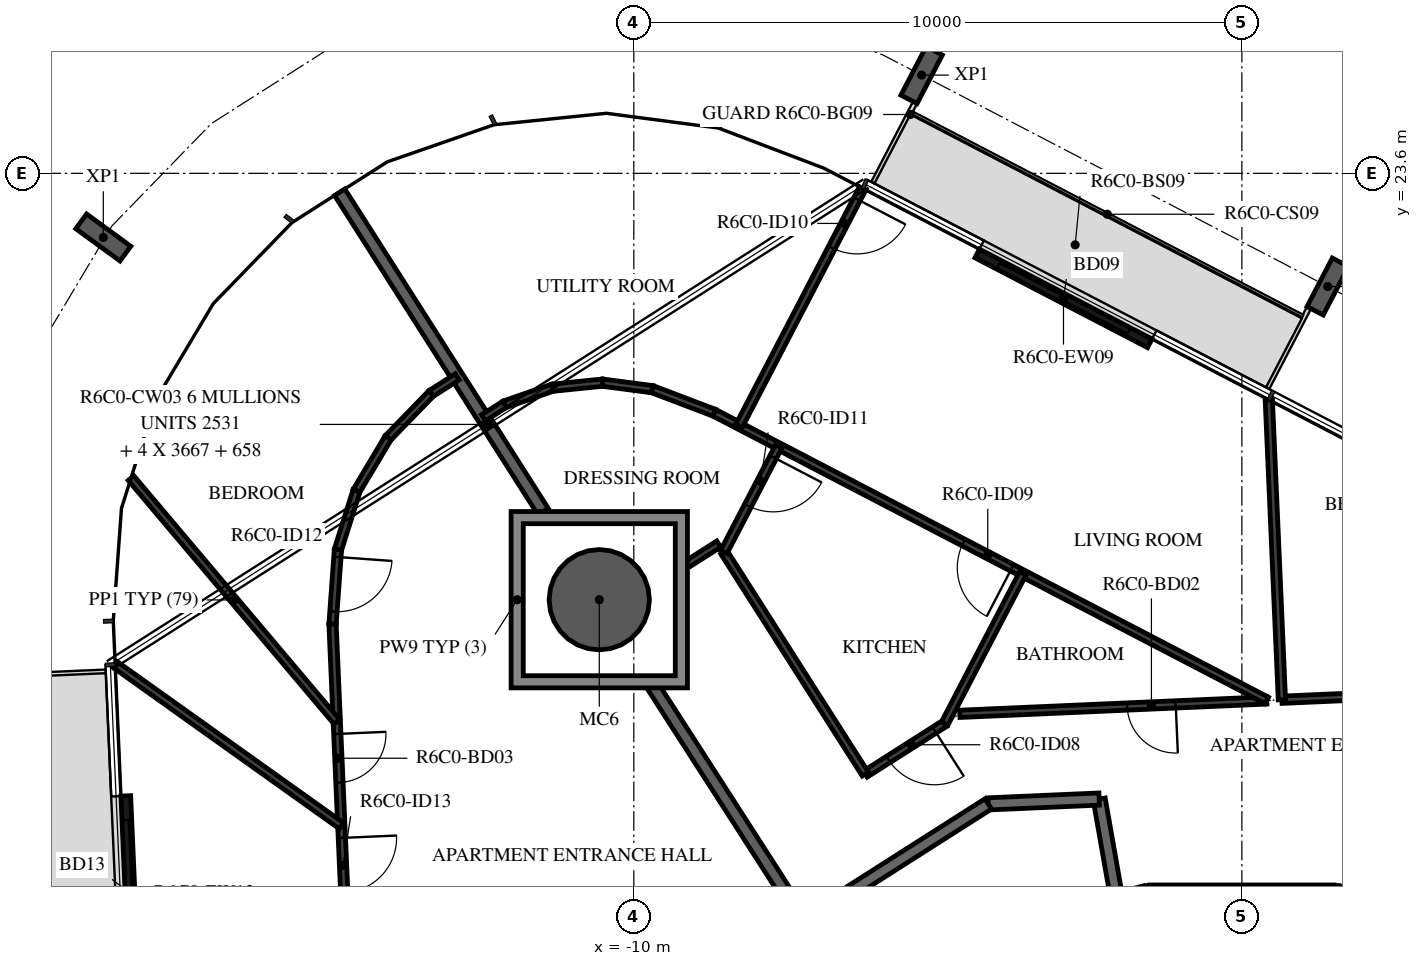
"""IFC4 building model, lengths in metres.
Left out: names, types, materials, properties, quantities, classifications, styles, units other than length and angle.
Written with IfcOpenShell. Run it as: python <this file> out.ifc"""

import sys

from ifc_helpers import new_model, si_unit, direction, frame, frame_2d, origin, origin_2d, place, context, subcontext, project, spatial, polyline, rectangle, hollow_circle, i_section, outline, extrude, element, fill, save


model = new_model("IFC4")
c1 = context("Model", 3, precision=1e-05, world=origin(), true_north=direction((0.0, 1.0)))
c2 = subcontext(c1, "Body", "Model", "MODEL_VIEW")
j1 = project(units=[si_unit("LENGTHUNIT", "METRE"), si_unit("PLANEANGLEUNIT", "RADIAN")], contexts=[c1])
p1 = place(None, origin())
s1 = spatial("IfcSite", under=j1, at=p1, CompositionType="ELEMENT")
p2 = place(p1, origin())
s2 = spatial("IfcBuilding", under=s1, at=p2, CompositionType="ELEMENT")
p3 = place(p2, frame((0.0, 0.0, 254.7)))
s3 = spatial("IfcBuildingStorey", under=s2, at=p3, CompositionType="ELEMENT", Elevation=254.7)
p4 = place(p3, frame((-10.568, 16.588, -0.38), z_axis=(0.0, 0.0, 1.0), x_axis=(1.0, 0.0, 0.0)))
e1 = element("IfcColumn", 1, at=p4, inside=s3, PredefinedType="COLUMN", context=c2, shape_type="SweptSolid", body=[
    extrude(hollow_circle(Radius=0.825, WallThickness=0.04, at=origin_2d()), origin(), (0.0, 0.0, 1.0), 2.616),
])
for number, where, z_axis, x_axis in (
    (2, (1.412, 21.739, -0.38), (0.0, 0.0, 1.0), (0.887, -0.462, 0.0)),
    (3, (-5.267, 25.216, -0.38), (0.0, 0.0, 1.0), (0.887, -0.462, 0.0)),
    (4, (-18.724, 22.545, -0.38), (0.0, 0.0, 1.0), (0.59, 0.808, 0.0)),
):
    element("IfcColumn", number, at=place(p3, frame(where, z_axis=z_axis, x_axis=x_axis)), inside=s3, PredefinedType="COLUMN", context=c2, shape_type="SweptSolid", body=[
        extrude(i_section(OverallWidth=0.3, OverallDepth=0.9, WebThickness=0.019, FlangeThickness=0.035, FilletRadius=0.03, at=origin_2d()), origin(), (0.0, 0.0, 1.0), 2.616),
    ])
p5 = place(p3, frame((-1.515, 20.804, 0.0), z_axis=(0.0, 0.0, 1.0), x_axis=(-0.887014349583, 0.461741858221, 0.0)))
e5 = element("IfcWall", 5, at=p5, inside=s3, PredefinedType="STANDARD", context=c2, shape_type="SweptSolid", body=[
    extrude(rectangle(XDim=3.2, YDim=0.16, at=frame_2d((1.6, 0.0))), origin(), (0.0, 0.0, 1.0), 3.05),
])
p6 = place(p5, frame((0.4, 0.0, 0.0)))
e6 = element("IfcOpeningElement", 6, at=p6, cuts=e5, PredefinedType="OPENING", context=c2, shape_type="SweptSolid", body=[
    extrude(rectangle(XDim=2.4, YDim=2.4, at=frame_2d((1.2, 1.2))), frame((0.0, 0.09, 0.0), z_axis=(0.0, -1.0, 0.0), x_axis=(1.0, 0.0, 0.0)), (0.0, 0.0, 1.0), 0.18),
])
p7 = place(p3, frame((-18.355, 13.362, 0.0), z_axis=(0.0, 0.0, 1.0), x_axis=(0.043639181999, -0.999047357133, 0.0)))
e7 = element("IfcWall", 7, at=p7, inside=s3, PredefinedType="STANDARD", context=c2, shape_type="SweptSolid", body=[
    extrude(rectangle(XDim=3.2, YDim=0.16, at=frame_2d((1.6, 0.0))), origin(), (0.0, 0.0, 1.0), 3.05),
])
p8 = place(p7, frame((0.4, 0.0, 0.0)))
e8 = element("IfcOpeningElement", 8, at=p8, cuts=e7, PredefinedType="OPENING", context=c2, shape_type="SweptSolid", body=[
    extrude(rectangle(XDim=2.4, YDim=2.4, at=frame_2d((1.2, 1.2))), frame((0.0, 0.09, 0.0), z_axis=(0.0, -1.0, 0.0), x_axis=(1.0, 0.0, 0.0)), (0.0, 0.0, 1.0), 0.18),
])
p9 = place(p3, frame((4.479, 10.858, 0.0), z_axis=(0.0, 0.0, 1.0), x_axis=(-0.965948410781, 0.258734743916, 0.0)))
e9 = element("IfcWall", 9, at=p9, inside=s3, PredefinedType="SHEAR", context=c2, shape_type="SweptSolid", body=[
    extrude(rectangle(XDim=3.033, YDim=0.5, at=frame_2d((1.516, 0.0))), origin(), (0.0, 0.0, 1.0), 3.05),
])
p10 = place(p9, frame((1.066, 0.0, 0.0)))
e10 = element("IfcOpeningElement", 10, at=p10, cuts=e9, PredefinedType="OPENING", context=c2, shape_type="SweptSolid", body=[
    extrude(rectangle(XDim=0.9, YDim=2.1, at=frame_2d((0.45, 1.05))), frame((0.0, 0.26, 0.0), z_axis=(0.0, -1.0, 0.0), x_axis=(1.0, 0.0, 0.0)), (0.0, 0.0, 1.0), 0.52),
])
for number, where, z_axis, x_axis in (
    (11, (1.516, 11.647, 0.0), (0.0, 0.0, 1.0), (-1.0, 0.0, 0.0)),
    (12, (-1.55, 11.643, 0.0), (0.0, 0.0, 1.0), (-0.966, -0.259, 0.0)),
):
    element("IfcWall", number, at=place(p3, frame(where, z_axis=z_axis, x_axis=x_axis)), inside=s3, PredefinedType="SHEAR", context=c2, shape_type="SweptSolid", body=[
        extrude(rectangle(XDim=3.033, YDim=0.5, at=frame_2d((1.516, 0.0))), origin(), (0.0, 0.0, 1.0), 3.05),
    ])
p11 = place(p3, frame((-2.074, 11.761, 0.0), z_axis=(0.0, 0.0, 1.0), x_axis=(-0.173679082312, 0.984802303189, 0.0)))
e13 = element("IfcWall", 13, at=p11, inside=s3, PredefinedType="STANDARD", context=c2, shape_type="SweptSolid", body=[
    extrude(rectangle(XDim=1.573, YDim=0.2, at=frame_2d((0.787, 0.0))), origin(), (0.0, 0.0, 1.0), 3.05),
])
p12 = place(p3, frame((-2.347, 13.31, 0.0), z_axis=(0.0, 0.0, 1.0), x_axis=(-0.999050095671, -0.043576442492, 0.0)))
e14 = element("IfcWall", 14, at=p12, inside=s3, PredefinedType="STANDARD", context=c2, shape_type="SweptSolid", body=[
    extrude(rectangle(XDim=1.826, YDim=0.2, at=frame_2d((0.913, 0.0))), origin(), (0.0, 0.0, 1.0), 3.05),
])
p13 = place(p3, frame((-4.172, 13.231, 0.0), z_axis=(0.0, 0.0, 1.0), x_axis=(-0.843388394728, -0.537304397561, 0.0)))
e15 = element("IfcWall", 15, at=p13, inside=s3, PredefinedType="STANDARD", context=c2, shape_type="SweptSolid", body=[
    extrude(rectangle(XDim=7.181, YDim=0.2, at=frame_2d((3.59, 0.0))), origin(), (0.0, 0.0, 1.0), 3.05),
])
p14 = place(p3, frame((-9.69, 15.171, 0.0), z_axis=(0.0, 0.0, 1.0), x_axis=(0.540961372678, -0.841047438181, 0.0)))
e16 = element("IfcWall", 16, at=p14, inside=s3, PredefinedType="STANDARD", context=c2, shape_type="SweptSolid", body=[
    extrude(rectangle(XDim=4.602, YDim=0.2, at=frame_2d((2.301, 0.0))), origin(), (0.0, 0.0, 1.0), 3.05),
])
p15 = place(p3, frame((-14.837, 23.29, 0.0), z_axis=(0.0, 0.0, 1.0), x_axis=(0.537316863221, -0.843380452998, 0.0)))
e17 = element("IfcWall", 17, at=p15, inside=s3, PredefinedType="STANDARD", context=c2, shape_type="SweptSolid", body=[
    extrude(rectangle(XDim=6.227, YDim=0.2, at=frame_2d((3.113, 0.0))), origin(), (0.0, 0.0, 1.0), 3.05),
])
p16 = place(p3, frame((3.339, 15.06, 0.0), z_axis=(0.0, 0.0, 1.0), x_axis=(-0.999045829762, -0.043674134634, 0.0)))
e18 = element("IfcWall", 18, at=p16, inside=s3, PredefinedType="PARTITIONING", context=c2, shape_type="SweptSolid", body=[
    extrude(rectangle(XDim=2.683, YDim=0.12, at=frame_2d((1.342, 0.0))), origin(), (0.0, 0.0, 1.0), 3.05),
])
p17 = place(p3, frame((0.41, 14.932, 0.0), z_axis=(0.0, 0.0, 1.0), x_axis=(-0.99904802852, -0.043623808982, 0.0)))
e19 = element("IfcWall", 19, at=p17, inside=s3, PredefinedType="PARTITIONING", context=c2, shape_type="SweptSolid", body=[
    extrude(rectangle(XDim=5.054, YDim=0.12, at=frame_2d((2.527, 0.0))), origin(), (0.0, 0.0, 1.0), 3.05),
])
p18 = place(p17, frame((1.5, 0.0, 0.0)))
e20 = element("IfcOpeningElement", 20, at=p18, cuts=e19, PredefinedType="OPENING", context=c2, shape_type="SweptSolid", body=[
    extrude(rectangle(XDim=0.8, YDim=2.1, at=frame_2d((0.4, 1.05))), frame((0.0, 0.07, 0.0), z_axis=(0.0, -1.0, 0.0), x_axis=(1.0, 0.0, 0.0)), (0.0, 0.0, 1.0), 0.14),
])
p19 = place(p3, frame((-4.888, 14.553, 0.0), z_axis=(0.0, 0.0, 1.0), x_axis=(-0.843349608892, -0.537365273517, 0.0)))
e21 = element("IfcWall", 21, at=p19, inside=s3, PredefinedType="PARTITIONING", context=c2, shape_type="SweptSolid", body=[
    extrude(rectangle(XDim=1.548, YDim=0.12, at=frame_2d((0.774, 0.0))), origin(), (0.0, 0.0, 1.0), 3.05),
])
p20 = place(p19, frame((0.2, 0.0, 0.0)))
e22 = element("IfcOpeningElement", 22, at=p20, cuts=e21, PredefinedType="OPENING", context=c2, shape_type="SweptSolid", body=[
    extrude(rectangle(XDim=0.9, YDim=2.1, at=frame_2d((0.45, 1.05))), frame((0.0, 0.07, 0.0), z_axis=(0.0, -1.0, 0.0), x_axis=(1.0, 0.0, 0.0)), (0.0, 0.0, 1.0), 0.14),
])
p21 = place(p3, frame((-6.194, 13.721, 0.0), z_axis=(0.0, 0.0, 1.0), x_axis=(-0.537316807294, 0.843380488629, 0.0)))
e23 = element("IfcWall", 23, at=p21, inside=s3, PredefinedType="PARTITIONING", context=c2, shape_type="SweptSolid", body=[
    extrude(rectangle(XDim=4.331, YDim=0.12, at=frame_2d((2.165, 0.0))), origin(), (0.0, 0.0, 1.0), 3.05),
])
p22 = place(p3, frame((-8.604, 17.504, 0.0), z_axis=(0.0, 0.0, 1.0), x_axis=(-0.843265746233, -0.537496866251, 0.0)))
e24 = element("IfcWall", 24, at=p22, inside=s3, PredefinedType="PARTITIONING", context=c2, shape_type="SweptSolid", body=[
    extrude(rectangle(XDim=0.61, YDim=0.12, at=frame_2d((0.305, 0.0))), origin(), (0.0, 0.0, 1.0), 3.05),
])
p23 = place(p3, frame((0.442, 19.876, 0.0), z_axis=(0.0, 0.0, 1.0), x_axis=(0.04366038102, -0.999046430918, 0.0)))
e25 = element("IfcWall", 25, at=p23, inside=s3, PredefinedType="PARTITIONING", context=c2, shape_type="SweptSolid", body=[
    extrude(rectangle(XDim=4.938, YDim=0.12, at=frame_2d((2.469, 0.0))), origin(), (0.0, 0.0, 1.0), 3.05),
])
p24 = place(p3, frame((0.41, 14.932, 0.0), z_axis=(0.0, 0.0, 1.0), x_axis=(-0.887012293034, 0.461745808867, 0.0)))
e26 = element("IfcWall", 26, at=p24, inside=s3, PredefinedType="PARTITIONING", context=c2, shape_type="SweptSolid", body=[
    extrude(rectangle(XDim=10.246, YDim=0.12, at=frame_2d((5.123, 0.0))), origin(), (0.0, 0.0, 1.0), 3.05),
])
p25 = place(p24, frame((4.725, 0.0, 0.0)))
e27 = element("IfcOpeningElement", 27, at=p25, cuts=e26, PredefinedType="OPENING", context=c2, shape_type="SweptSolid", body=[
    extrude(rectangle(XDim=0.9, YDim=2.1, at=frame_2d((0.45, 1.05))), frame((0.0, 0.07, 0.0), z_axis=(0.0, -1.0, 0.0), x_axis=(1.0, 0.0, 0.0)), (0.0, 0.0, 1.0), 0.14),
])
p26 = place(p3, frame((-3.603, 17.021, 0.0), z_axis=(0.0, 0.0, 1.0), x_axis=(-0.46178633653, -0.886991194654, 0.0)))
e28 = element("IfcWall", 28, at=p26, inside=s3, PredefinedType="PARTITIONING", context=c2, shape_type="SweptSolid", body=[
    extrude(rectangle(XDim=2.783, YDim=0.12, at=frame_2d((1.392, 0.0))), origin(), (0.0, 0.0, 1.0), 3.05),
])
p27 = place(p3, frame((-6.237, 23.353, 0.0), z_axis=(0.0, 0.0, 1.0), x_axis=(-0.461714347673, -0.88702866986, 0.0)))
e29 = element("IfcWall", 29, at=p27, inside=s3, PredefinedType="PARTITIONING", context=c2, shape_type="SweptSolid", body=[
    extrude(rectangle(XDim=4.4, YDim=0.12, at=frame_2d((2.2, 0.0))), origin(), (0.0, 0.0, 1.0), 3.05),
])
p28 = place(p27, frame((0.2, 0.0, 0.0)))
e30 = element("IfcOpeningElement", 30, at=p28, cuts=e29, PredefinedType="OPENING", context=c2, shape_type="SweptSolid", body=[
    extrude(rectangle(XDim=0.9, YDim=2.1, at=frame_2d((0.45, 1.05))), frame((0.0, 0.07, 0.0), z_axis=(0.0, -1.0, 0.0), x_axis=(1.0, 0.0, 0.0)), (0.0, 0.0, 1.0), 0.14),
])
p29 = place(p3, frame((-7.616, 19.11, 0.0), z_axis=(0.0, 0.0, 1.0), x_axis=(-0.461764840073, -0.887002385832, 0.0)))
e31 = element("IfcWall", 31, at=p29, inside=s3, PredefinedType="PARTITIONING", context=c2, shape_type="SweptSolid", body=[
    extrude(rectangle(XDim=1.958, YDim=0.12, at=frame_2d((0.979, 0.0))), origin(), (0.0, 0.0, 1.0), 3.05),
])
p30 = place(p29, frame((0.2, 0.0, 0.0)))
e32 = element("IfcOpeningElement", 32, at=p30, cuts=e31, PredefinedType="OPENING", context=c2, shape_type="SweptSolid", body=[
    extrude(rectangle(XDim=0.9, YDim=2.1, at=frame_2d((0.45, 1.05))), frame((0.0, 0.07, 0.0), z_axis=(0.0, -1.0, 0.0), x_axis=(1.0, 0.0, 0.0)), (0.0, 0.0, 1.0), 0.14),
])
p31 = place(p3, frame((-12.473, 19.579, 0.0), z_axis=(0.0, 0.0, 1.0), x_axis=(0.843467404643, 0.537180358264, 0.0)))
e33 = element("IfcWall", 33, at=p31, inside=s3, PredefinedType="PARTITIONING", context=c2, shape_type="SweptSolid", body=[
    extrude(rectangle(XDim=0.415, YDim=0.12, at=frame_2d((0.207, 0.0))), origin(), (0.0, 0.0, 1.0), 3.05),
])
for number, where, z_axis, x_axis in (
    (34, (-12.124, 19.802, 0.0), (0.0, 0.0, 1.0), (0.945, 0.328, 0.0)),
    (35, (-11.341, 20.074, 0.0), (0.0, 0.0, 1.0), (0.995, 0.102, 0.0)),
    (36, (-10.516, 20.158, 0.0), (0.0, 0.0, 1.0), (0.991, -0.131, 0.0)),
):
    element("IfcWall", number, at=place(p3, frame(where, z_axis=z_axis, x_axis=x_axis)), inside=s3, PredefinedType="PARTITIONING", context=c2, shape_type="SweptSolid", body=[
        extrude(rectangle(XDim=0.829, YDim=0.12, at=frame_2d((0.415, 0.0))), origin(), (0.0, 0.0, 1.0), 3.05),
    ])
p32 = place(p3, frame((-9.694, 20.05, 0.0), z_axis=(0.0, 0.0, 1.0), x_axis=(0.934647766222, -0.35557496129, 0.0)))
e37 = element("IfcWall", 37, at=p32, inside=s3, PredefinedType="PARTITIONING", context=c2, shape_type="SweptSolid", body=[
    extrude(rectangle(XDim=1.087, YDim=0.12, at=frame_2d((0.543, 0.0))), origin(), (0.0, 0.0, 1.0), 3.05),
])
p33 = place(p3, frame((-12.903, 20.254, 0.0), z_axis=(0.0, 0.0, 1.0), x_axis=(-0.843404143432, -0.537279676557, 0.0)))
e38 = element("IfcWall", 38, at=p33, inside=s3, PredefinedType="PARTITIONING", context=c2, shape_type="SweptSolid", body=[
    extrude(rectangle(XDim=0.508, YDim=0.12, at=frame_2d((0.254, 0.0))), origin(), (0.0, 0.0, 1.0), 3.05),
])
for number, where, z_axis, x_axis in (
    (39, (-13.332, 19.981, 0.0), (0.0, 0.0, 1.0), (-0.697, -0.717, 0.0)),
    (40, (-14.039, 19.252, 0.0), (0.0, 0.0, 1.0), (-0.513, -0.859, 0.0)),
    (41, (-14.56, 18.38, 0.0), (0.0, 0.0, 1.0), (-0.301, -0.954, 0.0)),
):
    element("IfcWall", number, at=place(p3, frame(where, z_axis=z_axis, x_axis=x_axis)), inside=s3, PredefinedType="PARTITIONING", context=c2, shape_type="SweptSolid", body=[
        extrude(rectangle(XDim=1.016, YDim=0.12, at=frame_2d((0.508, 0.0))), origin(), (0.0, 0.0, 1.0), 3.05),
    ])
p34 = place(p3, frame((-14.865, 17.411, 0.0), z_axis=(0.0, 0.0, 1.0), x_axis=(-0.072618457011, -0.997359794508, 0.0)))
e42 = element("IfcWall", 42, at=p34, inside=s3, PredefinedType="PARTITIONING", context=c2, shape_type="SweptSolid", body=[
    extrude(rectangle(XDim=1.227, YDim=0.12, at=frame_2d((0.614, 0.0))), origin(), (0.0, 0.0, 1.0), 3.05),
])
p35 = place(p34, frame((0.12, 0.0, 0.0)))
e43 = element("IfcOpeningElement", 43, at=p35, cuts=e42, PredefinedType="OPENING", context=c2, shape_type="SweptSolid", body=[
    extrude(rectangle(XDim=0.9, YDim=2.1, at=frame_2d((0.45, 1.05))), frame((0.0, 0.07, 0.0), z_axis=(0.0, -1.0, 0.0), x_axis=(1.0, 0.0, 0.0)), (0.0, 0.0, 1.0), 0.14),
])
p36 = place(p3, frame((-14.955, 16.187, 0.0), z_axis=(0.0, 0.0, 1.0), x_axis=(0.04360777668, -0.999048728448, 0.0)))
e44 = element("IfcWall", 44, at=p36, inside=s3, PredefinedType="PARTITIONING", context=c2, shape_type="SweptSolid", body=[
    extrude(rectangle(XDim=11.679, YDim=0.12, at=frame_2d((5.839, 0.0))), origin(), (0.0, 0.0, 1.0), 3.05),
])
p37 = place(p36, frame((1.808, 0.0, 0.0)))
e45 = element("IfcOpeningElement", 45, at=p37, cuts=e44, PredefinedType="OPENING", context=c2, shape_type="SweptSolid", body=[
    extrude(rectangle(XDim=0.8, YDim=2.1, at=frame_2d((0.4, 1.05))), frame((0.0, 0.07, 0.0), z_axis=(0.0, -1.0, 0.0), x_axis=(1.0, 0.0, 0.0)), (0.0, 0.0, 1.0), 0.14),
])
p38 = place(p36, frame((3.519, 0.0, 0.0)))
e46 = element("IfcOpeningElement", 46, at=p38, cuts=e44, PredefinedType="OPENING", context=c2, shape_type="SweptSolid", body=[
    extrude(rectangle(XDim=0.9, YDim=2.1, at=frame_2d((0.45, 1.05))), frame((0.0, 0.07, 0.0), z_axis=(0.0, -1.0, 0.0), x_axis=(1.0, 0.0, 0.0)), (0.0, 0.0, 1.0), 0.14),
])
p39 = place(p3, frame((-18.269, 18.589, 0.0), z_axis=(0.0, 0.0, 1.0), x_axis=(0.645124067673, -0.764077834588, 0.0)))
e47 = element("IfcWall", 47, at=p39, inside=s3, PredefinedType="PARTITIONING", context=c2, shape_type="SweptSolid", body=[
    extrude(rectangle(XDim=5.246, YDim=0.12, at=frame_2d((2.623, 0.0))), origin(), (0.0, 0.0, 1.0), 3.05),
])
p40 = place(p3, frame((-18.529, 15.522, 0.0), z_axis=(0.0, 0.0, 1.0), x_axis=(0.814350646776, -0.580373176582, 0.0)))
e48 = element("IfcWall", 48, at=p40, inside=s3, PredefinedType="PARTITIONING", context=c2, shape_type="SweptSolid", body=[
    extrude(rectangle(XDim=4.567, YDim=0.12, at=frame_2d((2.284, 0.0))), origin(), (0.0, 0.0, 1.0), 3.05),
])
p41 = place(p3, origin())
e49 = element("IfcWall", 49, at=p41, inside=s3, PredefinedType="STANDARD", context=c2, shape_type="SweptSolid", body=[
    extrude(outline(polyline([(-9.118, 18.038), (-9.118, 15.138), (-12.018, 15.138), (-12.018, 18.038), (-9.118, 18.038)]), holes=[polyline([(-11.818, 15.338), (-9.318, 15.338), (-9.318, 17.838), (-11.818, 17.838), (-11.818, 15.338)])]), origin(), (0.0, 0.0, 1.0), 3.05),
])
p42 = place(p6, origin())
e50 = element("IfcDoor", 50, at=p42, inside=s3, OperationType="DOUBLE_DOOR_SLIDING", PredefinedType="DOOR", context=c2, shape_type="SweptSolid", body=[
    extrude(rectangle(XDim=2.4, YDim=2.4, at=frame_2d((1.2, 1.2))), frame((0.0, 0.025, 0.0), z_axis=(0.0, -1.0, 0.0), x_axis=(1.0, 0.0, 0.0)), (0.0, 0.0, 1.0), 0.05),
])
fill(e6, e50)
p43 = place(p8, origin())
e51 = element("IfcDoor", 51, at=p43, inside=s3, OperationType="DOUBLE_DOOR_SLIDING", PredefinedType="DOOR", context=c2, shape_type="SweptSolid", body=[
    extrude(rectangle(XDim=2.4, YDim=2.4, at=frame_2d((1.2, 1.2))), frame((0.0, 0.025, 0.0), z_axis=(0.0, -1.0, 0.0), x_axis=(1.0, 0.0, 0.0)), (0.0, 0.0, 1.0), 0.05),
])
fill(e8, e51)
p44 = place(p18, origin())
e52 = element("IfcDoor", 52, at=p44, inside=s3, OperationType="SINGLE_SWING_RIGHT", PredefinedType="DOOR", context=c2, shape_type="SweptSolid", body=[
    extrude(rectangle(XDim=0.8, YDim=2.1, at=frame_2d((0.4, 1.05))), frame((0.0, 0.025, 0.0), z_axis=(0.0, -1.0, 0.0), x_axis=(1.0, 0.0, 0.0)), (0.0, 0.0, 1.0), 0.05),
])
fill(e20, e52)
p45 = place(p20, origin())
e53 = element("IfcDoor", 53, at=p45, inside=s3, OperationType="SINGLE_SWING_RIGHT", PredefinedType="DOOR", context=c2, shape_type="SweptSolid", body=[
    extrude(rectangle(XDim=0.9, YDim=2.1, at=frame_2d((0.45, 1.05))), frame((0.0, 0.025, 0.0), z_axis=(0.0, -1.0, 0.0), x_axis=(1.0, 0.0, 0.0)), (0.0, 0.0, 1.0), 0.05),
])
fill(e22, e53)
p46 = place(p25, origin())
e54 = element("IfcDoor", 54, at=p46, inside=s3, OperationType="SINGLE_SWING_RIGHT", PredefinedType="DOOR", context=c2, shape_type="SweptSolid", body=[
    extrude(rectangle(XDim=0.9, YDim=2.1, at=frame_2d((0.45, 1.05))), frame((0.0, 0.025, 0.0), z_axis=(0.0, -1.0, 0.0), x_axis=(1.0, 0.0, 0.0)), (0.0, 0.0, 1.0), 0.05),
])
fill(e27, e54)
p47 = place(p28, origin())
e55 = element("IfcDoor", 55, at=p47, inside=s3, OperationType="SINGLE_SWING_RIGHT", PredefinedType="DOOR", context=c2, shape_type="SweptSolid", body=[
    extrude(rectangle(XDim=0.9, YDim=2.1, at=frame_2d((0.45, 1.05))), frame((0.0, 0.025, 0.0), z_axis=(0.0, -1.0, 0.0), x_axis=(1.0, 0.0, 0.0)), (0.0, 0.0, 1.0), 0.05),
])
fill(e30, e55)
p48 = place(p30, origin())
e56 = element("IfcDoor", 56, at=p48, inside=s3, OperationType="SINGLE_SWING_RIGHT", PredefinedType="DOOR", context=c2, shape_type="SweptSolid", body=[
    extrude(rectangle(XDim=0.9, YDim=2.1, at=frame_2d((0.45, 1.05))), frame((0.0, 0.025, 0.0), z_axis=(0.0, -1.0, 0.0), x_axis=(1.0, 0.0, 0.0)), (0.0, 0.0, 1.0), 0.05),
])
fill(e32, e56)
p49 = place(p35, origin())
e57 = element("IfcDoor", 57, at=p49, inside=s3, OperationType="SINGLE_SWING_LEFT", PredefinedType="DOOR", context=c2, shape_type="SweptSolid", body=[
    extrude(rectangle(XDim=0.9, YDim=2.1, at=frame_2d((0.45, 1.05))), frame((0.0, 0.025, 0.0), z_axis=(0.0, -1.0, 0.0), x_axis=(1.0, 0.0, 0.0)), (0.0, 0.0, 1.0), 0.05),
])
fill(e43, e57)
p50 = place(p37, origin())
e58 = element("IfcDoor", 58, at=p50, inside=s3, OperationType="SINGLE_SWING_LEFT", PredefinedType="DOOR", context=c2, shape_type="SweptSolid", body=[
    extrude(rectangle(XDim=0.8, YDim=2.1, at=frame_2d((0.4, 1.05))), frame((0.0, 0.025, 0.0), z_axis=(0.0, -1.0, 0.0), x_axis=(1.0, 0.0, 0.0)), (0.0, 0.0, 1.0), 0.05),
])
fill(e45, e58)
p51 = place(p38, origin())
e59 = element("IfcDoor", 59, at=p51, inside=s3, OperationType="SINGLE_SWING_LEFT", PredefinedType="DOOR", context=c2, shape_type="SweptSolid", body=[
    extrude(rectangle(XDim=0.9, YDim=2.1, at=frame_2d((0.45, 1.05))), frame((0.0, 0.025, 0.0), z_axis=(0.0, -1.0, 0.0), x_axis=(1.0, 0.0, 0.0)), (0.0, 0.0, 1.0), 0.05),
])
fill(e46, e59)
save(model, sys.argv[1])
